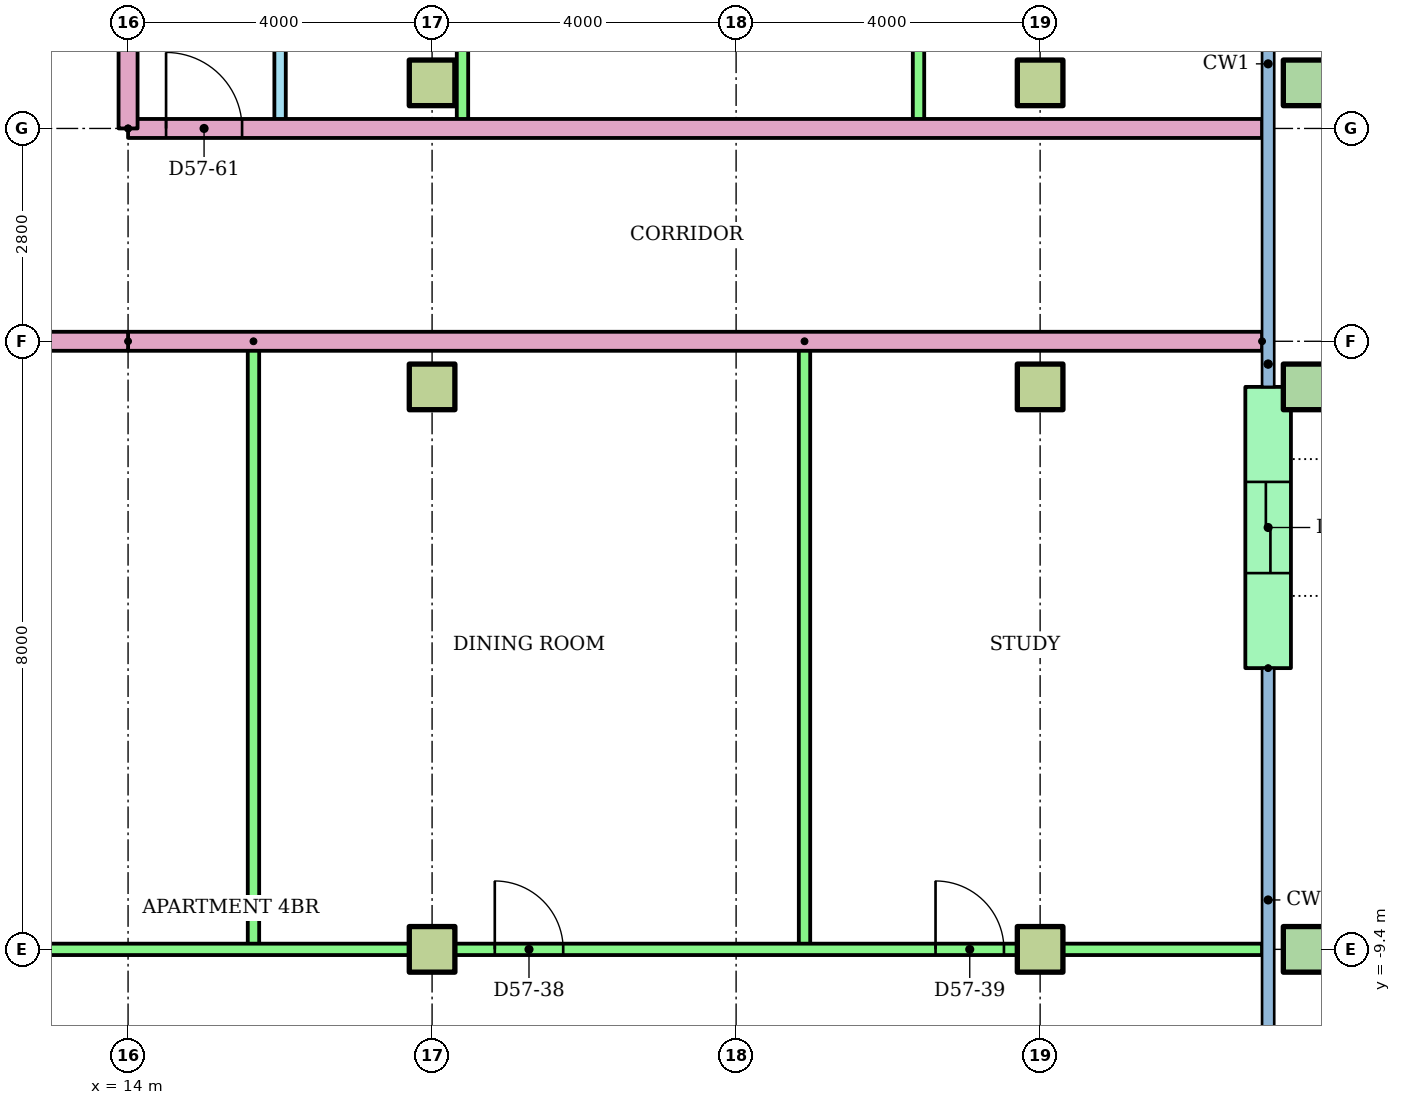
"""IFC4 building model, lengths in metres.
Left out: names, types, materials, properties, quantities, classifications, styles, units other than length and angle.
Written with IfcOpenShell. Run it as: python <this file> out.ifc"""

import sys

from ifc_helpers import new_model, si_unit, direction, frame, frame_2d, origin, origin_2d, place, context, subcontext, project, spatial, rectangle, hollow_rectangle, extrude, element, fill, save


model = new_model("IFC4")
c1 = context("Model", 3, precision=1e-05, world=origin(), true_north=direction((0.0, 1.0)))
c2 = subcontext(c1, "Body", "Model", "MODEL_VIEW")
j1 = project(units=[si_unit("LENGTHUNIT", "METRE"), si_unit("PLANEANGLEUNIT", "RADIAN")], contexts=[c1])
p1 = place(None, origin())
s1 = spatial("IfcSite", under=j1, at=p1, CompositionType="ELEMENT")
p2 = place(p1, origin())
s2 = spatial("IfcBuilding", under=s1, at=p2, CompositionType="ELEMENT")
p3 = place(p2, frame((0.0, 0.0, 220.4)))
s3 = spatial("IfcBuildingStorey", under=s2, at=p3, CompositionType="ELEMENT", Elevation=220.4)
for number, where in (
    (1, (18.0, -9.4, 0.0)),
    (2, (26.0, -9.4, 0.0)),
):
    element("IfcColumn", number, at=place(p3, frame(where)), inside=s3, PredefinedType="COLUMN", context=c2, shape_type="SweptSolid", body=[
        extrude(rectangle(XDim=0.6, YDim=0.6, at=origin_2d()), origin(), (0.0, 0.0, 1.0), 3.2),
    ])
p4 = place(p3, frame((29.5, -9.4, 0.0)))
e3 = element("IfcColumn", 3, at=p4, inside=s3, PredefinedType="COLUMN", context=c2, shape_type="SweptSolid", body=[
    extrude(hollow_rectangle(XDim=0.6, YDim=0.6, WallThickness=0.03, at=origin_2d()), origin(), (0.0, 0.0, 1.0), 3.2),
])
for number, where in (
    (4, (18.0, -2.0, 0.0)),
    (5, (26.0, -2.0, 0.0)),
):
    element("IfcColumn", number, at=place(p3, frame(where)), inside=s3, PredefinedType="COLUMN", context=c2, shape_type="SweptSolid", body=[
        extrude(rectangle(XDim=0.6, YDim=0.6, at=origin_2d()), origin(), (0.0, 0.0, 1.0), 3.2),
    ])
p5 = place(p3, frame((29.5, -2.0, 0.0)))
e6 = element("IfcColumn", 6, at=p5, inside=s3, PredefinedType="COLUMN", context=c2, shape_type="SweptSolid", body=[
    extrude(hollow_rectangle(XDim=0.6, YDim=0.6, WallThickness=0.03, at=origin_2d()), origin(), (0.0, 0.0, 1.0), 3.2),
])
for number, where in (
    (7, (18.0, 2.0, 0.0)),
    (8, (26.0, 2.0, 0.0)),
):
    element("IfcColumn", number, at=place(p3, frame(where)), inside=s3, PredefinedType="COLUMN", context=c2, shape_type="SweptSolid", body=[
        extrude(rectangle(XDim=0.6, YDim=0.6, at=origin_2d()), origin(), (0.0, 0.0, 1.0), 3.2),
    ])
p6 = place(p3, frame((29.5, 2.0, 0.0)))
e9 = element("IfcColumn", 9, at=p6, inside=s3, PredefinedType="COLUMN", context=c2, shape_type="SweptSolid", body=[
    extrude(hollow_rectangle(XDim=0.6, YDim=0.6, WallThickness=0.03, at=origin_2d()), origin(), (0.0, 0.0, 1.0), 3.2),
])
p7 = place(p3, frame((29.0, -5.7, 0.0), z_axis=(0.0, 0.0, 1.0), x_axis=(0.0, 1.0, 0.0)))
e10 = element("IfcWall", 10, at=p7, inside=s3, PredefinedType="STANDARD", context=c2, shape_type="SweptSolid", body=[
    extrude(rectangle(XDim=3.7, YDim=0.6, at=frame_2d((1.85, 0.0))), origin(), (0.0, 0.0, 1.0), 2.92),
])
p8 = place(p7, frame((1.25, 0.0, 0.0)))
e11 = element("IfcOpeningElement", 11, at=p8, cuts=e10, PredefinedType="OPENING", context=c2, shape_type="SweptSolid", body=[
    extrude(rectangle(XDim=1.2, YDim=2.1, at=frame_2d((0.6, 1.05))), frame((0.0, 0.31, 0.0), z_axis=(0.0, -1.0, 0.0), x_axis=(1.0, 0.0, 0.0)), (0.0, 0.0, 1.0), 0.62),
])
for number, where, z_axis, x_axis in (
    (12, (15.65, -1.4, 0.0), (0.0, 0.0, 1.0), (0.0, -1.0, 0.0)),
    (13, (22.9, -1.4, 0.0), (0.0, 0.0, 1.0), (0.0, -1.0, 0.0)),
):
    element("IfcWall", number, at=place(p3, frame(where, z_axis=z_axis, x_axis=x_axis)), inside=s3, PredefinedType="PARTITIONING", context=c2, shape_type="SweptSolid", body=[
        extrude(rectangle(XDim=8.0, YDim=0.15, at=frame_2d((4.0, 0.0))), origin(), (0.0, 0.0, 1.0), 2.4),
    ])
p9 = place(p3, frame((4.0, -9.4, 0.0)))
e14 = element("IfcWall", 14, at=p9, inside=s3, PredefinedType="PARTITIONING", context=c2, shape_type="SweptSolid", body=[
    extrude(rectangle(XDim=24.92, YDim=0.15, at=frame_2d((12.46, 0.0))), origin(), (0.0, 0.0, 1.0), 2.4),
])
p10 = place(p9, frame((6.575, 0.0, 0.0)))
e15 = element("IfcOpeningElement", 15, at=p10, cuts=e14, PredefinedType="OPENING", context=c2, shape_type="SweptSolid", body=[
    extrude(rectangle(XDim=0.9, YDim=2.1, at=frame_2d((0.45, 1.05))), frame((0.0, 0.085, 0.0), z_axis=(0.0, -1.0, 0.0), x_axis=(1.0, 0.0, 0.0)), (0.0, 0.0, 1.0), 0.17),
])
p11 = place(p9, frame((14.825, 0.0, 0.0)))
e16 = element("IfcOpeningElement", 16, at=p11, cuts=e14, PredefinedType="OPENING", context=c2, shape_type="SweptSolid", body=[
    extrude(rectangle(XDim=0.9, YDim=2.1, at=frame_2d((0.45, 1.05))), frame((0.0, 0.085, 0.0), z_axis=(0.0, -1.0, 0.0), x_axis=(1.0, 0.0, 0.0)), (0.0, 0.0, 1.0), 0.17),
])
p12 = place(p9, frame((20.624, 0.0, 0.0)))
e17 = element("IfcOpeningElement", 17, at=p12, cuts=e14, PredefinedType="OPENING", context=c2, shape_type="SweptSolid", body=[
    extrude(rectangle(XDim=0.9, YDim=2.1, at=frame_2d((0.45, 1.05))), frame((0.0, 0.085, 0.0), z_axis=(0.0, -1.0, 0.0), x_axis=(1.0, 0.0, 0.0)), (0.0, 0.0, 1.0), 0.17),
])
p13 = place(p3, frame((28.92, -1.4, 0.0), z_axis=(0.0, 0.0, 1.0), x_axis=(-1.0, 0.0, 0.0)))
e18 = element("IfcWall", 18, at=p13, inside=s3, PredefinedType="PARTITIONING", context=c2, shape_type="SweptSolid", body=[
    extrude(rectangle(XDim=14.92, YDim=0.25, at=frame_2d((7.46, 0.0))), origin(), (0.0, 0.0, 1.0), 2.4),
])
p14 = place(p3, frame((16.0, 11.8, 0.0), z_axis=(0.0, 0.0, 1.0), x_axis=(0.0, -1.0, 0.0)))
e19 = element("IfcWall", 19, at=p14, inside=s3, PredefinedType="PARTITIONING", context=c2, shape_type="SweptSolid", body=[
    extrude(rectangle(XDim=10.4, YDim=0.15, at=frame_2d((5.2, 0.0))), origin(), (0.0, 0.0, 1.0), 2.4),
])
p15 = place(p14, frame((7.075, 0.0, 0.0)))
e20 = element("IfcOpeningElement", 20, at=p15, cuts=e19, PredefinedType="OPENING", context=c2, shape_type="SweptSolid", body=[
    extrude(rectangle(XDim=0.9, YDim=2.1, at=frame_2d((0.45, 1.05))), frame((0.0, 0.085, 0.0), z_axis=(0.0, -1.0, 0.0), x_axis=(1.0, 0.0, 0.0)), (0.0, 0.0, 1.0), 0.17),
])
p16 = place(p14, frame((1.925, 0.0, 0.0)))
e21 = element("IfcOpeningElement", 21, at=p16, cuts=e19, PredefinedType="OPENING", context=c2, shape_type="SweptSolid", body=[
    extrude(rectangle(XDim=0.8, YDim=2.1, at=frame_2d((0.4, 1.05))), frame((0.0, 0.085, 0.0), z_axis=(0.0, -1.0, 0.0), x_axis=(1.0, 0.0, 0.0)), (0.0, 0.0, 1.0), 0.17),
])
for number, where, z_axis, x_axis in (
    (22, (18.4, 11.8, 0.0), (0.0, 0.0, 1.0), (0.0, -1.0, 0.0)),
    (23, (24.4, 11.8, 0.0), (0.0, 0.0, 1.0), (0.0, -1.0, 0.0)),
):
    element("IfcWall", number, at=place(p3, frame(where, z_axis=z_axis, x_axis=x_axis)), inside=s3, PredefinedType="PARTITIONING", context=c2, shape_type="SweptSolid", body=[
        extrude(rectangle(XDim=10.4, YDim=0.15, at=frame_2d((5.2, 0.0))), origin(), (0.0, 0.0, 1.0), 2.4),
    ])
p17 = place(p3, frame((14.0, 1.4, 0.0)))
e24 = element("IfcWall", 24, at=p17, inside=s3, PredefinedType="PARTITIONING", context=c2, shape_type="SweptSolid", body=[
    extrude(rectangle(XDim=14.92, YDim=0.25, at=frame_2d((7.46, 0.0))), origin(), (0.0, 0.0, 1.0), 2.4),
])
p18 = place(p17, frame((0.5, 0.0, 0.0)))
e25 = element("IfcOpeningElement", 25, at=p18, cuts=e24, PredefinedType="OPENING", context=c2, shape_type="SweptSolid", body=[
    extrude(rectangle(XDim=1.0, YDim=2.1, at=frame_2d((0.5, 1.05))), frame((0.0, 0.135, 0.0), z_axis=(0.0, -1.0, 0.0), x_axis=(1.0, 0.0, 0.0)), (0.0, 0.0, 1.0), 0.27),
])
p19 = place(p3, frame((14.0, -1.4, 0.0), z_axis=(0.0, 0.0, 1.0), x_axis=(-1.0, 0.0, 0.0)))
e26 = element("IfcWall", 26, at=p19, inside=s3, PredefinedType="PARTITIONING", context=c2, shape_type="SweptSolid", body=[
    extrude(rectangle(XDim=28.0, YDim=0.25, at=frame_2d((14.0, 0.0))), origin(), (0.0, 0.0, 1.0), 2.4),
])
p20 = place(p19, frame((20.5, 0.0, 0.0)))
e27 = element("IfcOpeningElement", 27, at=p20, cuts=e26, PredefinedType="OPENING", context=c2, shape_type="SweptSolid", body=[
    extrude(rectangle(XDim=1.0, YDim=2.1, at=frame_2d((0.5, 1.05))), frame((0.0, 0.135, 0.0), z_axis=(0.0, -1.0, 0.0), x_axis=(1.0, 0.0, 0.0)), (0.0, 0.0, 1.0), 0.27),
])
p21 = place(p19, frame((12.5, 0.0, 0.0)))
e28 = element("IfcOpeningElement", 28, at=p21, cuts=e26, PredefinedType="OPENING", context=c2, shape_type="SweptSolid", body=[
    extrude(rectangle(XDim=1.0, YDim=2.1, at=frame_2d((0.5, 1.05))), frame((0.0, 0.135, 0.0), z_axis=(0.0, -1.0, 0.0), x_axis=(1.0, 0.0, 0.0)), (0.0, 0.0, 1.0), 0.27),
])
p22 = place(p19, frame((10.5, 0.0, 0.0)))
e29 = element("IfcOpeningElement", 29, at=p22, cuts=e26, PredefinedType="OPENING", context=c2, shape_type="SweptSolid", body=[
    extrude(rectangle(XDim=1.0, YDim=2.1, at=frame_2d((0.5, 1.05))), frame((0.0, 0.135, 0.0), z_axis=(0.0, -1.0, 0.0), x_axis=(1.0, 0.0, 0.0)), (0.0, 0.0, 1.0), 0.27),
])
p23 = place(p3, frame((14.0, 1.4, 0.0), z_axis=(0.0, 0.0, 1.0), x_axis=(0.0, 1.0, 0.0)))
e30 = element("IfcWall", 30, at=p23, inside=s3, PredefinedType="PARTITIONING", context=c2, shape_type="SweptSolid", body=[
    extrude(rectangle(XDim=1.6, YDim=0.25, at=frame_2d((0.8, 0.0))), origin(), (0.0, 0.0, 1.0), 2.4),
])
p24 = place(p11, origin())
e31 = element("IfcDoor", 31, at=p24, inside=s3, OperationType="SINGLE_SWING_LEFT", PredefinedType="DOOR", context=c2, shape_type="SweptSolid", body=[
    extrude(rectangle(XDim=0.9, YDim=2.1, at=frame_2d((0.45, 1.05))), frame((0.0, 0.025, 0.0), z_axis=(0.0, -1.0, 0.0), x_axis=(1.0, 0.0, 0.0)), (0.0, 0.0, 1.0), 0.05),
])
fill(e16, e31)
p25 = place(p12, origin())
e32 = element("IfcDoor", 32, at=p25, inside=s3, OperationType="SINGLE_SWING_LEFT", PredefinedType="DOOR", context=c2, shape_type="SweptSolid", body=[
    extrude(rectangle(XDim=0.9, YDim=2.1, at=frame_2d((0.45, 1.05))), frame((0.0, 0.025, 0.0), z_axis=(0.0, -1.0, 0.0), x_axis=(1.0, 0.0, 0.0)), (0.0, 0.0, 1.0), 0.05),
])
fill(e17, e32)
p26 = place(p18, origin())
e33 = element("IfcDoor", 33, at=p26, inside=s3, OperationType="SINGLE_SWING_LEFT", PredefinedType="DOOR", context=c2, shape_type="SweptSolid", body=[
    extrude(rectangle(XDim=1.0, YDim=2.1, at=frame_2d((0.5, 1.05))), frame((0.0, 0.025, 0.0), z_axis=(0.0, -1.0, 0.0), x_axis=(1.0, 0.0, 0.0)), (0.0, 0.0, 1.0), 0.05),
])
fill(e25, e33)
p27 = place(p8, origin())
e34 = element("IfcDoor", 34, at=p27, inside=s3, OperationType="SLIDING_TO_LEFT", PredefinedType="DOOR", context=c2, shape_type="SweptSolid", body=[
    extrude(rectangle(XDim=1.2, YDim=2.1, at=frame_2d((0.6, 1.05))), frame((0.0, 0.025, 0.0), z_axis=(0.0, -1.0, 0.0), x_axis=(1.0, 0.0, 0.0)), (0.0, 0.0, 1.0), 0.05),
])
fill(e11, e34)
save(model, sys.argv[1])
